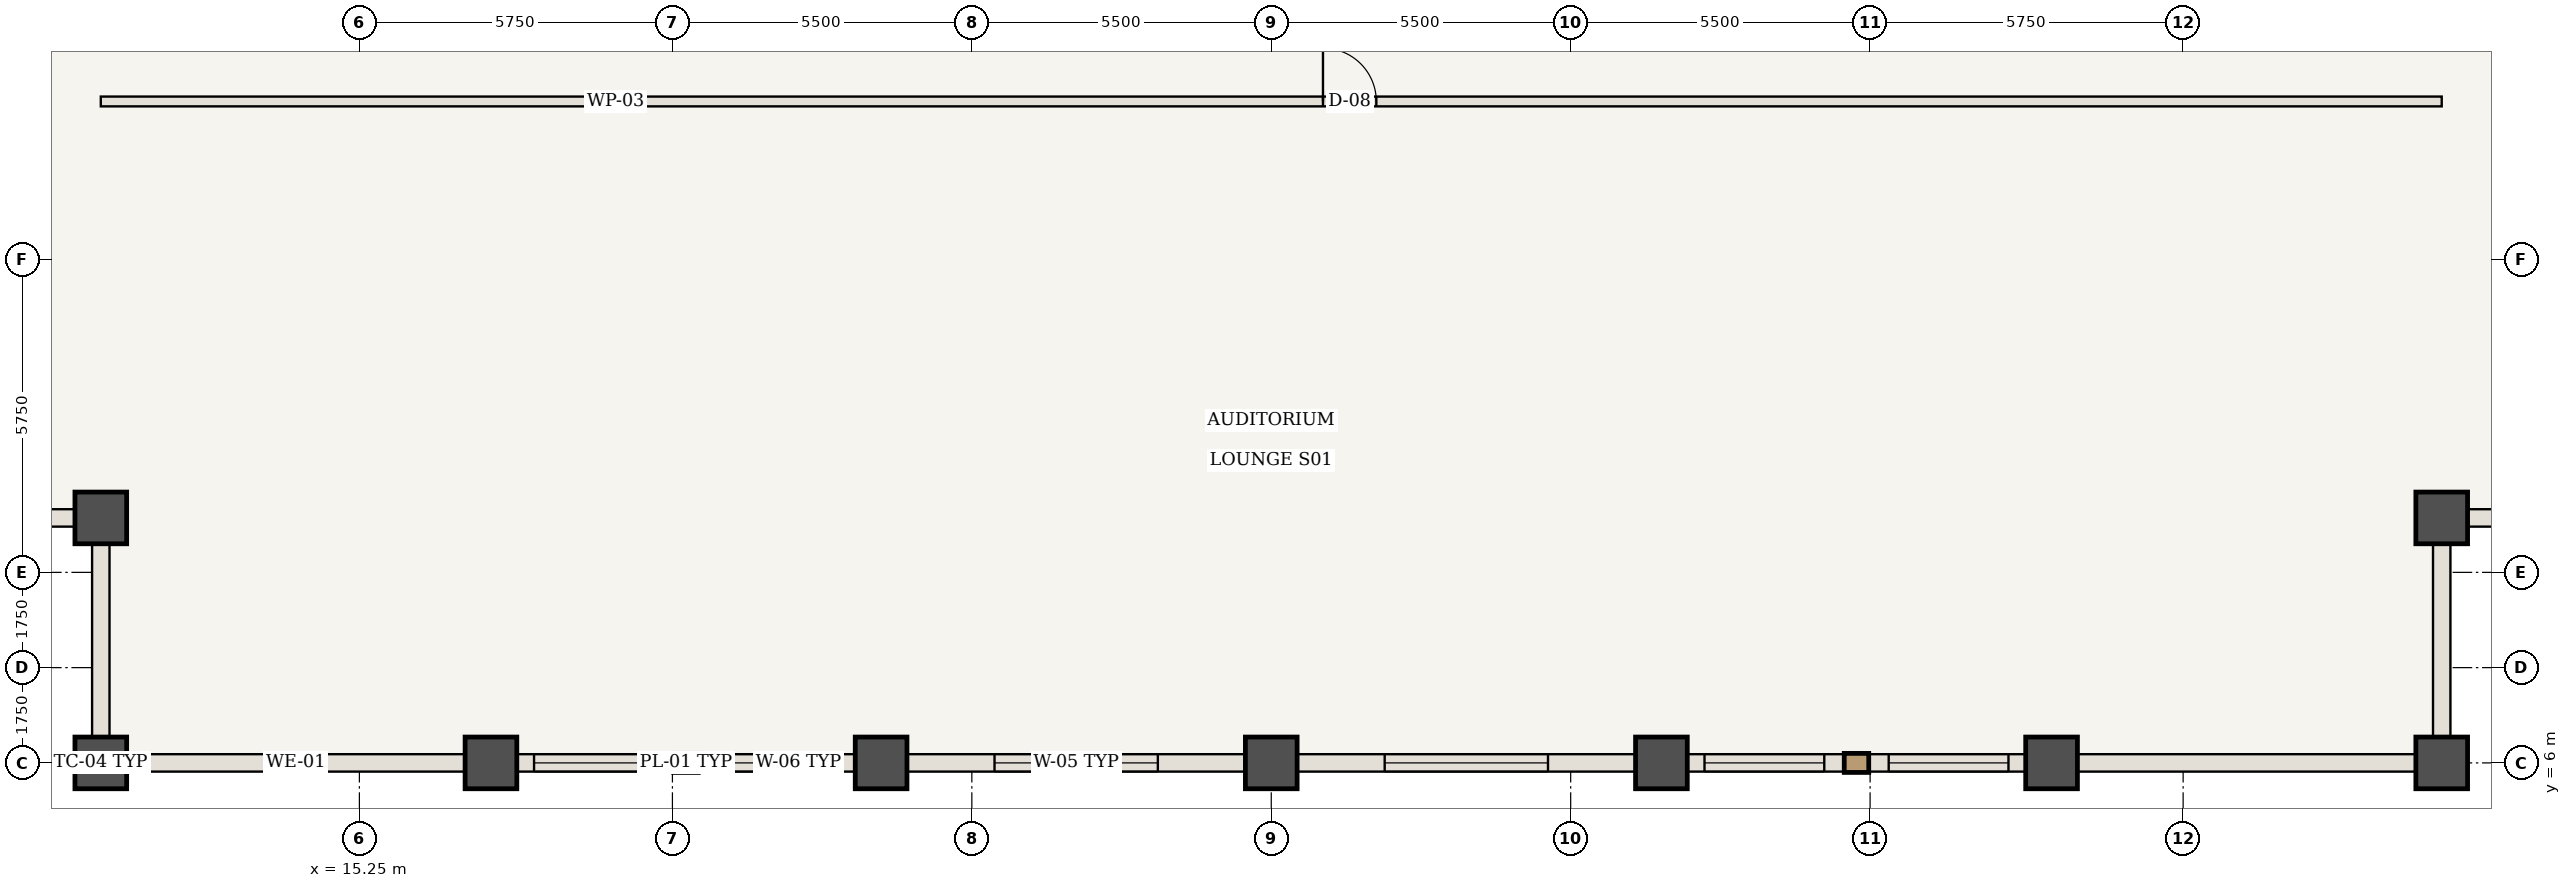
"""IFC4 building model, lengths in metres.
Left out: names, types, materials, properties, quantities, classifications, styles, units other than length and angle.
Written with IfcOpenShell. Run it as: python <this file> out.ifc"""

import sys

from ifc_helpers import new_model, si_unit, direction, frame, frame_2d, origin, origin_2d, place, context, subcontext, project, spatial, rectangle, extrude, element, fill, save


model = new_model("IFC4")
c1 = context("Model", 3, precision=1e-05, world=origin(), true_north=direction((0.0, 1.0)))
c2 = subcontext(c1, "Body", "Model", "MODEL_VIEW")
j1 = project(units=[si_unit("LENGTHUNIT", "METRE"), si_unit("PLANEANGLEUNIT", "RADIAN")], contexts=[c1])
p1 = place(None, origin())
s1 = spatial("IfcSite", under=j1, at=p1, CompositionType="ELEMENT")
p2 = place(p1, origin())
s2 = spatial("IfcBuilding", under=s1, at=p2, CompositionType="ELEMENT")
p3 = place(p2, frame((0.0, 0.0, 168.35)))
s3 = spatial("IfcBuildingStorey", under=s2, at=p3, CompositionType="ELEMENT", Elevation=168.35)
for number, where, z_axis, x_axis in (
    (1, (10.5, 6.0, 0.0), (0.0, 0.0, 1.0), (1.0, 0.0, 0.0)),
    (2, (10.5, 10.5, 0.0), (0.0, 0.0, 1.0), (1.0, 0.0, 0.0)),
    (3, (53.5, 6.0, 0.0), (0.0, 0.0, 1.0), (1.0, 0.0, 0.0)),
    (4, (53.5, 10.5, 0.0), (0.0, 0.0, 1.0), (1.0, 0.0, 0.0)),
    (5, (17.667, 6.0, 0.0), (0.0, 0.0, 1.0), (1.0, 0.0, 0.0)),
    (6, (24.833, 6.0, 0.0), (0.0, 0.0, 1.0), (1.0, 0.0, 0.0)),
    (7, (32.0, 6.0, 0.0), (0.0, 0.0, 1.0), (1.0, 0.0, 0.0)),
    (8, (39.167, 6.0, 0.0), (0.0, 0.0, 1.0), (1.0, 0.0, 0.0)),
    (9, (46.333, 6.0, 0.0), (0.0, 0.0, 1.0), (1.0, 0.0, 0.0)),
):
    element("IfcColumn", number, at=place(p3, frame(where, z_axis=z_axis, x_axis=x_axis)), inside=s3, PredefinedType="COLUMN", context=c2, shape_type="SweptSolid", body=[
        extrude(rectangle(XDim=0.95, YDim=0.95, at=origin_2d()), origin(), (0.0, 0.0, 1.0), 3.85),
    ])
p4 = place(p3, frame((10.5, 18.15, 0.0), z_axis=(0.0, 0.0, 1.0), x_axis=(1.0, 0.0, 0.0)))
e10 = element("IfcWall", 10, at=p4, inside=s3, PredefinedType="STANDARD", context=c2, shape_type="SweptSolid", body=[
    extrude(rectangle(XDim=43.0, YDim=0.18, at=frame_2d((21.5, 0.0))), origin(), (0.0, 0.0, 1.0), 3.685),
])
p5 = place(p4, frame((22.45, 0.0, 0.0)))
e11 = element("IfcOpeningElement", 11, at=p5, cuts=e10, PredefinedType="OPENING", context=c2, shape_type="SweptSolid", body=[
    extrude(rectangle(XDim=0.98, YDim=2.2, at=frame_2d((0.49, 1.1))), frame((0.0, 0.1, 0.0), z_axis=(0.0, -1.0, 0.0), x_axis=(1.0, 0.0, 0.0)), (0.0, 0.0, 1.0), 0.2),
])
p6 = place(p3, frame((17.667, 6.0, 0.0), z_axis=(0.0, 0.0, 1.0), x_axis=(-1.0, 0.0, 0.0)))
e12 = element("IfcWall", 12, at=p6, inside=s3, PredefinedType="USERDEFINED", context=c2, shape_type="SweptSolid", body=[
    extrude(rectangle(XDim=7.167, YDim=0.32, at=frame_2d((3.583, 0.0))), origin(), (0.0, 0.0, 1.0), 2.885),
])
p7 = place(p3, frame((24.833, 6.0, 0.0), z_axis=(0.0, 0.0, 1.0), x_axis=(-1.0, 0.0, 0.0)))
e13 = element("IfcWall", 13, at=p7, inside=s3, PredefinedType="USERDEFINED", context=c2, shape_type="SweptSolid", body=[
    extrude(rectangle(XDim=7.167, YDim=0.32, at=frame_2d((3.583, 0.0))), origin(), (0.0, 0.0, 1.0), 2.885),
])
p8 = place(p7, frame((0.792, 0.0, 0.85)))
e14 = element("IfcOpeningElement", 14, at=p8, cuts=e13, PredefinedType="OPENING", context=c2, shape_type="SweptSolid", body=[
    extrude(rectangle(XDim=2.2, YDim=1.835, at=frame_2d((1.1, 0.917))), frame((0.0, 0.17, 0.0), z_axis=(0.0, -1.0, 0.0), x_axis=(1.0, 0.0, 0.0)), (0.0, 0.0, 1.0), 0.34),
])
p9 = place(p7, frame((4.175, 0.0, 0.85)))
e15 = element("IfcOpeningElement", 15, at=p9, cuts=e13, PredefinedType="OPENING", context=c2, shape_type="SweptSolid", body=[
    extrude(rectangle(XDim=2.2, YDim=1.835, at=frame_2d((1.1, 0.917))), frame((0.0, 0.17, 0.0), z_axis=(0.0, -1.0, 0.0), x_axis=(1.0, 0.0, 0.0)), (0.0, 0.0, 1.0), 0.34),
])
p10 = place(p3, frame((32.0, 6.0, 0.0), z_axis=(0.0, 0.0, 1.0), x_axis=(-1.0, 0.0, 0.0)))
e16 = element("IfcWall", 16, at=p10, inside=s3, PredefinedType="USERDEFINED", context=c2, shape_type="SweptSolid", body=[
    extrude(rectangle(XDim=7.167, YDim=0.32, at=frame_2d((3.583, 0.0))), origin(), (0.0, 0.0, 1.0), 2.885),
])
p11 = place(p10, frame((2.083, 0.0, 0.85)))
e17 = element("IfcOpeningElement", 17, at=p11, cuts=e16, PredefinedType="OPENING", context=c2, shape_type="SweptSolid", body=[
    extrude(rectangle(XDim=3.0, YDim=1.835, at=frame_2d((1.5, 0.917))), frame((0.0, 0.17, 0.0), z_axis=(0.0, -1.0, 0.0), x_axis=(1.0, 0.0, 0.0)), (0.0, 0.0, 1.0), 0.34),
])
p12 = place(p3, frame((39.167, 6.0, 0.0), z_axis=(0.0, 0.0, 1.0), x_axis=(-1.0, 0.0, 0.0)))
e18 = element("IfcWall", 18, at=p12, inside=s3, PredefinedType="USERDEFINED", context=c2, shape_type="SweptSolid", body=[
    extrude(rectangle(XDim=7.167, YDim=0.32, at=frame_2d((3.583, 0.0))), origin(), (0.0, 0.0, 1.0), 2.885),
])
p13 = place(p12, frame((2.083, 0.0, 0.85)))
e19 = element("IfcOpeningElement", 19, at=p13, cuts=e18, PredefinedType="OPENING", context=c2, shape_type="SweptSolid", body=[
    extrude(rectangle(XDim=3.0, YDim=1.835, at=frame_2d((1.5, 0.917))), frame((0.0, 0.17, 0.0), z_axis=(0.0, -1.0, 0.0), x_axis=(1.0, 0.0, 0.0)), (0.0, 0.0, 1.0), 0.34),
])
p14 = place(p3, frame((46.333, 6.0, 0.0), z_axis=(0.0, 0.0, 1.0), x_axis=(-1.0, 0.0, 0.0)))
e20 = element("IfcWall", 20, at=p14, inside=s3, PredefinedType="USERDEFINED", context=c2, shape_type="SweptSolid", body=[
    extrude(rectangle(XDim=7.167, YDim=0.32, at=frame_2d((3.583, 0.0))), origin(), (0.0, 0.0, 1.0), 2.885),
])
p15 = place(p14, frame((0.792, 0.0, 0.85)))
e21 = element("IfcOpeningElement", 21, at=p15, cuts=e20, PredefinedType="OPENING", context=c2, shape_type="SweptSolid", body=[
    extrude(rectangle(XDim=2.2, YDim=1.835, at=frame_2d((1.1, 0.917))), frame((0.0, 0.17, 0.0), z_axis=(0.0, -1.0, 0.0), x_axis=(1.0, 0.0, 0.0)), (0.0, 0.0, 1.0), 0.34),
])
p16 = place(p14, frame((4.175, 0.0, 0.85)))
e22 = element("IfcOpeningElement", 22, at=p16, cuts=e20, PredefinedType="OPENING", context=c2, shape_type="SweptSolid", body=[
    extrude(rectangle(XDim=2.2, YDim=1.835, at=frame_2d((1.1, 0.917))), frame((0.0, 0.17, 0.0), z_axis=(0.0, -1.0, 0.0), x_axis=(1.0, 0.0, 0.0)), (0.0, 0.0, 1.0), 0.34),
])
p17 = place(p3, frame((53.5, 6.0, 0.0), z_axis=(0.0, 0.0, 1.0), x_axis=(-1.0, 0.0, 0.0)))
e23 = element("IfcWall", 23, at=p17, inside=s3, PredefinedType="USERDEFINED", context=c2, shape_type="SweptSolid", body=[
    extrude(rectangle(XDim=7.167, YDim=0.32, at=frame_2d((3.583, 0.0))), origin(), (0.0, 0.0, 1.0), 2.885),
])
for number, where, z_axis, x_axis in (
    (24, (10.5, 6.0, 0.0), (0.0, 0.0, 1.0), (0.0, 1.0, 0.0)),
    (25, (10.5, 10.5, 0.0), (0.0, 0.0, 1.0), (-1.0, 0.0, 0.0)),
    (26, (53.5, 10.5, 0.0), (0.0, 0.0, 1.0), (0.0, -1.0, 0.0)),
    (27, (58.0, 10.5, 0.0), (0.0, 0.0, 1.0), (-1.0, 0.0, 0.0)),
):
    element("IfcWall", number, at=place(p3, frame(where, z_axis=z_axis, x_axis=x_axis)), inside=s3, PredefinedType="USERDEFINED", context=c2, shape_type="SweptSolid", body=[
        extrude(rectangle(XDim=4.5, YDim=0.32, at=frame_2d((2.25, 0.0))), origin(), (0.0, 0.0, 1.0), 2.885),
    ])
p18 = place(p5, origin())
e28 = element("IfcDoor", 28, at=p18, inside=s3, OperationType="SINGLE_SWING_LEFT", PredefinedType="DOOR", context=c2, shape_type="SweptSolid", body=[
    extrude(rectangle(XDim=0.98, YDim=2.2, at=frame_2d((0.49, 1.1))), frame((0.0, 0.025, 0.0), z_axis=(0.0, -1.0, 0.0), x_axis=(1.0, 0.0, 0.0)), (0.0, 0.0, 1.0), 0.05),
])
fill(e11, e28)
p19 = place(p8, origin())
e29 = element("IfcWindow", 29, at=p19, inside=s3, PartitioningType="SINGLE_PANEL", PredefinedType="WINDOW", context=c2, shape_type="SweptSolid", body=[
    extrude(rectangle(XDim=2.2, YDim=1.835, at=frame_2d((1.1, 0.917))), frame((0.0, 0.03, 0.0), z_axis=(0.0, -1.0, 0.0), x_axis=(1.0, 0.0, 0.0)), (0.0, 0.0, 1.0), 0.06),
])
fill(e14, e29)
p20 = place(p9, origin())
e30 = element("IfcWindow", 30, at=p20, inside=s3, PartitioningType="SINGLE_PANEL", PredefinedType="WINDOW", context=c2, shape_type="SweptSolid", body=[
    extrude(rectangle(XDim=2.2, YDim=1.835, at=frame_2d((1.1, 0.917))), frame((0.0, 0.03, 0.0), z_axis=(0.0, -1.0, 0.0), x_axis=(1.0, 0.0, 0.0)), (0.0, 0.0, 1.0), 0.06),
])
fill(e15, e30)
p21 = place(p11, origin())
e31 = element("IfcWindow", 31, at=p21, inside=s3, PartitioningType="SINGLE_PANEL", PredefinedType="WINDOW", context=c2, shape_type="SweptSolid", body=[
    extrude(rectangle(XDim=3.0, YDim=1.835, at=frame_2d((1.5, 0.917))), frame((0.0, 0.03, 0.0), z_axis=(0.0, -1.0, 0.0), x_axis=(1.0, 0.0, 0.0)), (0.0, 0.0, 1.0), 0.06),
])
fill(e17, e31)
p22 = place(p13, origin())
e32 = element("IfcWindow", 32, at=p22, inside=s3, PartitioningType="SINGLE_PANEL", PredefinedType="WINDOW", context=c2, shape_type="SweptSolid", body=[
    extrude(rectangle(XDim=3.0, YDim=1.835, at=frame_2d((1.5, 0.917))), frame((0.0, 0.03, 0.0), z_axis=(0.0, -1.0, 0.0), x_axis=(1.0, 0.0, 0.0)), (0.0, 0.0, 1.0), 0.06),
])
fill(e19, e32)
p23 = place(p15, origin())
e33 = element("IfcWindow", 33, at=p23, inside=s3, PartitioningType="SINGLE_PANEL", PredefinedType="WINDOW", context=c2, shape_type="SweptSolid", body=[
    extrude(rectangle(XDim=2.2, YDim=1.835, at=frame_2d((1.1, 0.917))), frame((0.0, 0.03, 0.0), z_axis=(0.0, -1.0, 0.0), x_axis=(1.0, 0.0, 0.0)), (0.0, 0.0, 1.0), 0.06),
])
fill(e21, e33)
p24 = place(p16, origin())
e34 = element("IfcWindow", 34, at=p24, inside=s3, PartitioningType="SINGLE_PANEL", PredefinedType="WINDOW", context=c2, shape_type="SweptSolid", body=[
    extrude(rectangle(XDim=2.2, YDim=1.835, at=frame_2d((1.1, 0.917))), frame((0.0, 0.03, 0.0), z_axis=(0.0, -1.0, 0.0), x_axis=(1.0, 0.0, 0.0)), (0.0, 0.0, 1.0), 0.06),
])
fill(e22, e34)
save(model, sys.argv[1])
